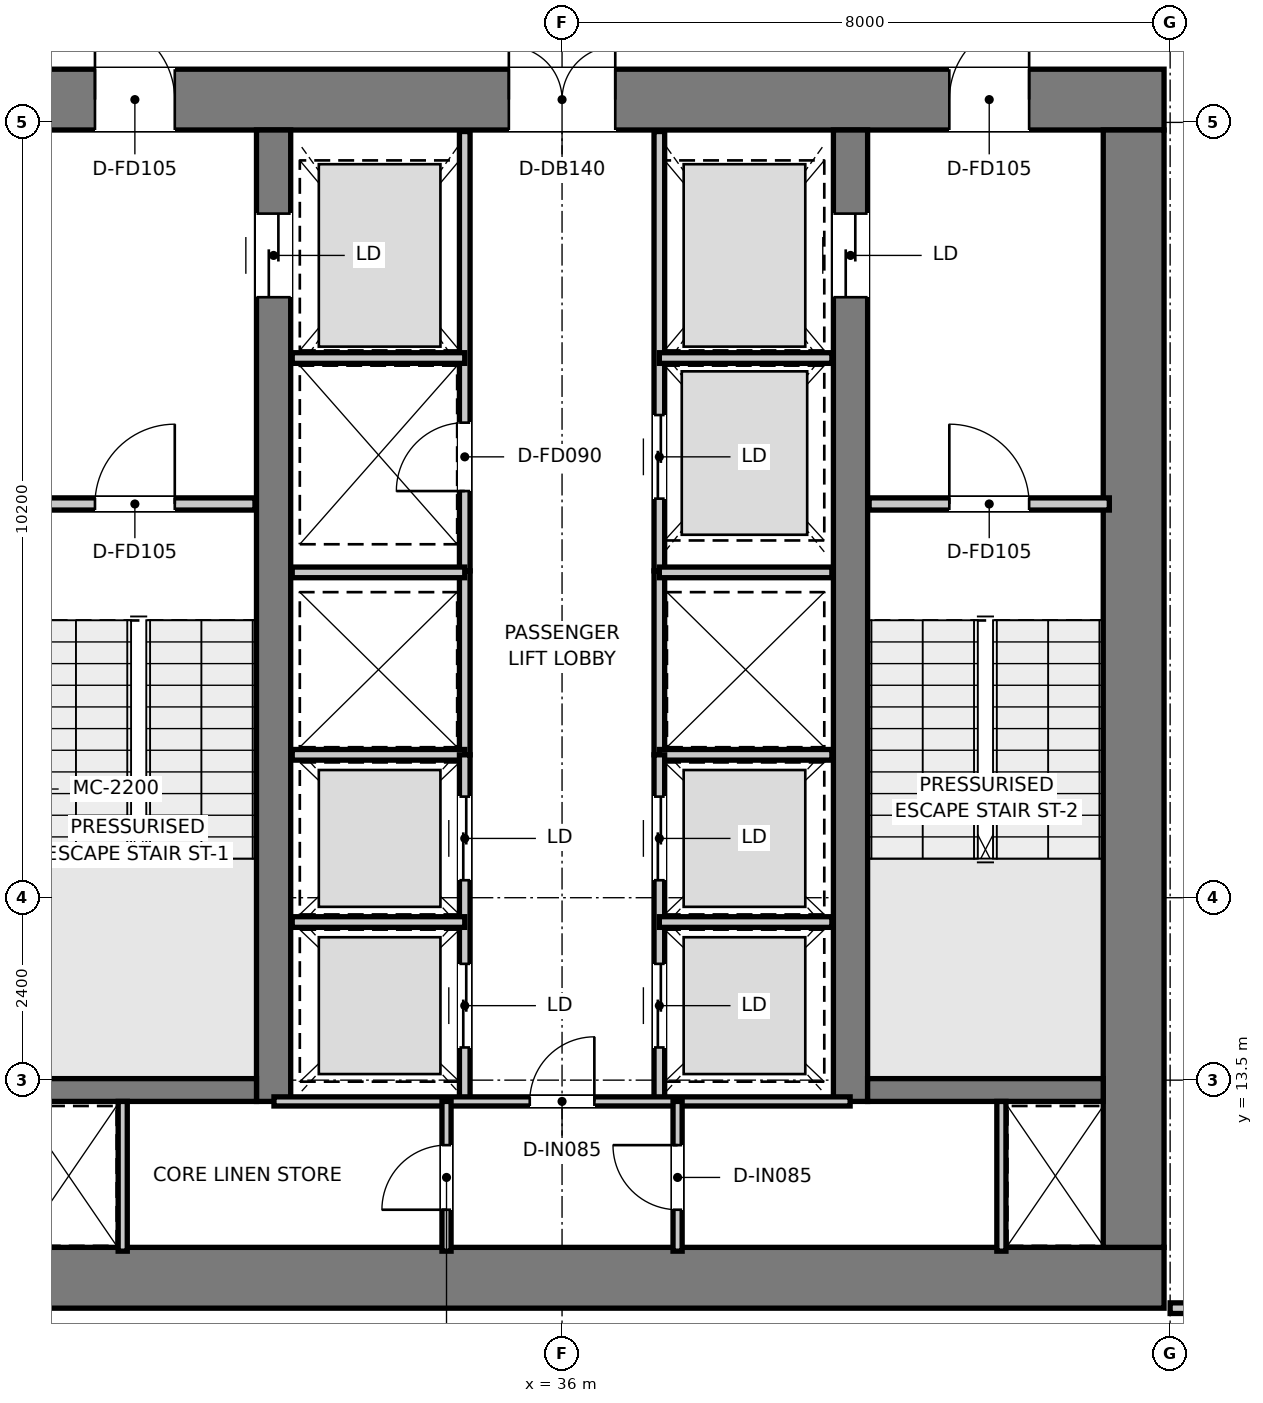
"""IFC4 building model, lengths in metres.
Left out: names, types, materials, properties, quantities, classifications, styles, units other than length and angle.
Written with IfcOpenShell. Run it as: python <this file> out.ifc"""

import sys

from ifc_helpers import new_model, si_unit, direction, frame, frame_2d, origin, place, context, subcontext, project, spatial, rectangle, extrude, element, fill, save


model = new_model("IFC4")
c1 = context("Model", 3, precision=1e-05, world=origin(), true_north=direction((0.0, 1.0)))
c2 = subcontext(c1, "Body", "Model", "MODEL_VIEW")
j1 = project(units=[si_unit("LENGTHUNIT", "METRE"), si_unit("PLANEANGLEUNIT", "RADIAN")], contexts=[c1])
p1 = place(None, origin())
s1 = spatial("IfcSite", under=j1, at=p1, CompositionType="ELEMENT")
p2 = place(p1, origin())
s2 = spatial("IfcBuilding", under=s1, at=p2, CompositionType="ELEMENT")
p3 = place(p2, frame((0.0, 0.0, 40.8)))
s3 = spatial("IfcBuildingStorey", under=s2, at=p3, CompositionType="ELEMENT", Elevation=40.8)
p4 = place(p3, frame((28.08, 10.9, 0.0), z_axis=(0.0, 0.0, 1.0), x_axis=(1.0, 0.0, 0.0)))
e1 = element("IfcWall", 1, at=p4, inside=s3, PredefinedType="SHEAR", context=c2, shape_type="SweptSolid", body=[
    extrude(rectangle(XDim=15.84, YDim=0.8, at=frame_2d((7.92, 0.0))), origin(), (0.0, 0.0, 1.0), 3.95),
])
p5 = place(p3, frame((28.08, 26.4, 0.0), z_axis=(0.0, 0.0, 1.0), x_axis=(1.0, 0.0, 0.0)))
e2 = element("IfcWall", 2, at=p5, inside=s3, PredefinedType="SHEAR", context=c2, shape_type="SweptSolid", body=[
    extrude(rectangle(XDim=15.84, YDim=0.8, at=frame_2d((7.92, 0.0))), origin(), (0.0, 0.0, 1.0), 3.95),
])
p6 = place(p5, frame((7.22, 0.0, 0.0)))
e3 = element("IfcOpeningElement", 3, at=p6, cuts=e2, PredefinedType="OPENING", context=c2, shape_type="SweptSolid", body=[
    extrude(rectangle(XDim=1.4, YDim=2.2, at=frame_2d((0.7, 1.1))), frame((0.0, 0.41, 0.0), z_axis=(0.0, -1.0, 0.0), x_axis=(1.0, 0.0, 0.0)), (0.0, 0.0, 1.0), 0.82),
])
p7 = place(p5, frame((1.775, 0.0, 0.0)))
e4 = element("IfcOpeningElement", 4, at=p7, cuts=e2, PredefinedType="OPENING", context=c2, shape_type="SweptSolid", body=[
    extrude(rectangle(XDim=1.05, YDim=2.1, at=frame_2d((0.525, 1.05))), frame((0.0, 0.41, 0.0), z_axis=(0.0, -1.0, 0.0), x_axis=(1.0, 0.0, 0.0)), (0.0, 0.0, 1.0), 0.82),
])
p8 = place(p5, frame((13.015, 0.0, 0.0)))
e5 = element("IfcOpeningElement", 5, at=p8, cuts=e2, PredefinedType="OPENING", context=c2, shape_type="SweptSolid", body=[
    extrude(rectangle(XDim=1.05, YDim=2.1, at=frame_2d((0.525, 1.05))), frame((0.0, 0.41, 0.0), z_axis=(0.0, -1.0, 0.0), x_axis=(1.0, 0.0, 0.0)), (0.0, 0.0, 1.0), 0.82),
])
p9 = place(p3, frame((43.52, 11.3, 0.0), z_axis=(0.0, 0.0, 1.0), x_axis=(0.0, 1.0, 0.0)))
e6 = element("IfcWall", 6, at=p9, inside=s3, PredefinedType="SHEAR", context=c2, shape_type="SweptSolid", body=[
    extrude(rectangle(XDim=14.7, YDim=0.8, at=frame_2d((7.35, 0.0))), origin(), (0.0, 0.0, 1.0), 3.95),
])
p10 = place(p3, frame((32.205, 13.22, 0.0), z_axis=(0.0, 0.0, 1.0), x_axis=(0.0, 1.0, 0.0)))
e7 = element("IfcWall", 7, at=p10, inside=s3, PredefinedType="SHEAR", context=c2, shape_type="SweptSolid", body=[
    extrude(rectangle(XDim=12.78, YDim=0.45, at=frame_2d((6.39, 0.0))), origin(), (0.0, 0.0, 1.0), 3.95),
])
p11 = place(p10, frame((10.58, 0.0, 0.0)))
e8 = element("IfcOpeningElement", 8, at=p11, cuts=e7, PredefinedType="OPENING", context=c2, shape_type="SweptSolid", body=[
    extrude(rectangle(XDim=1.1, YDim=2.15, at=frame_2d((0.55, 1.075))), frame((0.0, 0.235, 0.0), z_axis=(0.0, -1.0, 0.0), x_axis=(1.0, 0.0, 0.0)), (0.0, 0.0, 1.0), 0.47),
])
p12 = place(p3, frame((39.795, 13.22, 0.0), z_axis=(0.0, 0.0, 1.0), x_axis=(0.0, 1.0, 0.0)))
e9 = element("IfcWall", 9, at=p12, inside=s3, PredefinedType="SHEAR", context=c2, shape_type="SweptSolid", body=[
    extrude(rectangle(XDim=12.78, YDim=0.45, at=frame_2d((6.39, 0.0))), origin(), (0.0, 0.0, 1.0), 3.95),
])
p13 = place(p12, frame((10.58, 0.0, 0.0)))
e10 = element("IfcOpeningElement", 10, at=p13, cuts=e9, PredefinedType="OPENING", context=c2, shape_type="SweptSolid", body=[
    extrude(rectangle(XDim=1.1, YDim=2.15, at=frame_2d((0.55, 1.075))), frame((0.0, 0.235, 0.0), z_axis=(0.0, -1.0, 0.0), x_axis=(1.0, 0.0, 0.0)), (0.0, 0.0, 1.0), 0.47),
])
for number, where, z_axis, x_axis in (
    (11, (28.88, 13.37, 0.0), (0.0, 0.0, 1.0), (1.0, 0.0, 0.0)),
    (12, (40.02, 13.37, 0.0), (0.0, 0.0, 1.0), (1.0, 0.0, 0.0)),
):
    element("IfcWall", number, at=place(p3, frame(where, z_axis=z_axis, x_axis=x_axis)), inside=s3, PredefinedType="SHEAR", context=c2, shape_type="SweptSolid", body=[
        extrude(rectangle(XDim=3.1, YDim=0.3, at=frame_2d((1.55, 0.0))), origin(), (0.0, 0.0, 1.0), 3.95),
    ])
p14 = place(p3, frame((28.8, 21.08, 0.0), z_axis=(0.0, 0.0, 1.0), x_axis=(1.0, 0.0, 0.0)))
e13 = element("IfcWall", 13, at=p14, inside=s3, PredefinedType="PARTITIONING", context=c2, shape_type="SweptSolid", body=[
    extrude(rectangle(XDim=3.16, YDim=0.16, at=frame_2d((1.58, 0.0))), origin(), (0.0, 0.0, 1.0), 3.67),
])
p15 = place(p14, frame((1.055, 0.0, 0.0)))
e14 = element("IfcOpeningElement", 14, at=p15, cuts=e13, PredefinedType="OPENING", context=c2, shape_type="SweptSolid", body=[
    extrude(rectangle(XDim=1.05, YDim=2.1, at=frame_2d((0.525, 1.05))), frame((0.0, 0.09, 0.0), z_axis=(0.0, -1.0, 0.0), x_axis=(1.0, 0.0, 0.0)), (0.0, 0.0, 1.0), 0.18),
])
p16 = place(p3, frame((40.04, 21.08, 0.0), z_axis=(0.0, 0.0, 1.0), x_axis=(1.0, 0.0, 0.0)))
e15 = element("IfcWall", 15, at=p16, inside=s3, PredefinedType="PARTITIONING", context=c2, shape_type="SweptSolid", body=[
    extrude(rectangle(XDim=3.16, YDim=0.16, at=frame_2d((1.58, 0.0))), origin(), (0.0, 0.0, 1.0), 3.67),
])
p17 = place(p16, frame((1.055, 0.0, 0.0)))
e16 = element("IfcOpeningElement", 16, at=p17, cuts=e15, PredefinedType="OPENING", context=c2, shape_type="SweptSolid", body=[
    extrude(rectangle(XDim=1.05, YDim=2.1, at=frame_2d((0.525, 1.05))), frame((0.0, 0.09, 0.0), z_axis=(0.0, -1.0, 0.0), x_axis=(1.0, 0.0, 0.0)), (0.0, 0.0, 1.0), 0.18),
])
p18 = place(p3, frame((34.72, 20.2, 0.0), z_axis=(0.0, 0.0, 1.0), x_axis=(0.0, 1.0, 0.0)))
e17 = element("IfcWall", 17, at=p18, inside=s3, PredefinedType="PARTITIONING", context=c2, shape_type="SweptSolid", body=[
    extrude(rectangle(XDim=5.78, YDim=0.14, at=frame_2d((2.89, 0.0))), origin(), (0.0, 0.0, 1.0), 2.47),
])
p19 = place(p18, frame((1.05, 0.0, 0.0)))
e18 = element("IfcOpeningElement", 18, at=p19, cuts=e17, PredefinedType="OPENING", context=c2, shape_type="SweptSolid", body=[
    extrude(rectangle(XDim=0.9, YDim=2.1, at=frame_2d((0.45, 1.05))), frame((0.0, 0.08, 0.0), z_axis=(0.0, -1.0, 0.0), x_axis=(1.0, 0.0, 0.0)), (0.0, 0.0, 1.0), 0.16),
])
p20 = place(p3, frame((37.28, 20.2, 0.0), z_axis=(0.0, 0.0, 1.0), x_axis=(0.0, 1.0, 0.0)))
e19 = element("IfcWall", 19, at=p20, inside=s3, PredefinedType="PARTITIONING", context=c2, shape_type="SweptSolid", body=[
    extrude(rectangle(XDim=5.78, YDim=0.14, at=frame_2d((2.89, 0.0))), origin(), (0.0, 0.0, 1.0), 2.47),
])
p21 = place(p20, frame((0.95, 0.0, 0.0)))
e20 = element("IfcOpeningElement", 20, at=p21, cuts=e19, PredefinedType="OPENING", context=c2, shape_type="SweptSolid", body=[
    extrude(rectangle(XDim=1.1, YDim=2.15, at=frame_2d((0.55, 1.075))), frame((0.0, 0.08, 0.0), z_axis=(0.0, -1.0, 0.0), x_axis=(1.0, 0.0, 0.0)), (0.0, 0.0, 1.0), 0.16),
])
for number, where, z_axis, x_axis in (
    (21, (32.45, 23.0, 0.0), (0.0, 0.0, 1.0), (1.0, 0.0, 0.0)),
    (22, (37.28, 23.0, 0.0), (0.0, 0.0, 1.0), (1.0, 0.0, 0.0)),
):
    element("IfcWall", number, at=place(p3, frame(where, z_axis=z_axis, x_axis=x_axis)), inside=s3, PredefinedType="PARTITIONING", context=c2, shape_type="SweptSolid", body=[
        extrude(rectangle(XDim=2.27, YDim=0.14, at=frame_2d((1.135, 0.0))), origin(), (0.0, 0.0, 1.0), 2.47),
    ])
for number, where, z_axis, x_axis in (
    (23, (34.72, 17.78, 0.0), (0.0, 0.0, 1.0), (0.0, 1.0, 0.0)),
    (24, (37.28, 17.78, 0.0), (0.0, 0.0, 1.0), (0.0, 1.0, 0.0)),
):
    element("IfcWall", number, at=place(p3, frame(where, z_axis=z_axis, x_axis=x_axis)), inside=s3, PredefinedType="PARTITIONING", context=c2, shape_type="SweptSolid", body=[
        extrude(rectangle(XDim=2.42, YDim=0.14, at=frame_2d((1.21, 0.0))), origin(), (0.0, 0.0, 1.0), 3.67),
    ])
for number, where, z_axis, x_axis in (
    (25, (32.45, 17.78, 0.0), (0.0, 0.0, 1.0), (1.0, 0.0, 0.0)),
    (26, (32.45, 20.18, 0.0), (0.0, 0.0, 1.0), (1.0, 0.0, 0.0)),
    (27, (37.28, 17.78, 0.0), (0.0, 0.0, 1.0), (1.0, 0.0, 0.0)),
    (28, (37.28, 20.18, 0.0), (0.0, 0.0, 1.0), (1.0, 0.0, 0.0)),
):
    element("IfcWall", number, at=place(p3, frame(where, z_axis=z_axis, x_axis=x_axis)), inside=s3, PredefinedType="PARTITIONING", context=c2, shape_type="SweptSolid", body=[
        extrude(rectangle(XDim=2.27, YDim=0.14, at=frame_2d((1.135, 0.0))), origin(), (0.0, 0.0, 1.0), 3.67),
    ])
p22 = place(p3, frame((34.72, 13.22, 0.0), z_axis=(0.0, 0.0, 1.0), x_axis=(0.0, 1.0, 0.0)))
e29 = element("IfcWall", 29, at=p22, inside=s3, PredefinedType="PARTITIONING", context=c2, shape_type="SweptSolid", body=[
    extrude(rectangle(XDim=4.56, YDim=0.14, at=frame_2d((2.28, 0.0))), origin(), (0.0, 0.0, 1.0), 3.67),
])
p23 = place(p22, frame((0.71, 0.0, 0.0)))
e30 = element("IfcOpeningElement", 30, at=p23, cuts=e29, PredefinedType="OPENING", context=c2, shape_type="SweptSolid", body=[
    extrude(rectangle(XDim=1.1, YDim=2.15, at=frame_2d((0.55, 1.075))), frame((0.0, 0.08, 0.0), z_axis=(0.0, -1.0, 0.0), x_axis=(1.0, 0.0, 0.0)), (0.0, 0.0, 1.0), 0.16),
])
p24 = place(p22, frame((2.91, 0.0, 0.0)))
e31 = element("IfcOpeningElement", 31, at=p24, cuts=e29, PredefinedType="OPENING", context=c2, shape_type="SweptSolid", body=[
    extrude(rectangle(XDim=1.1, YDim=2.15, at=frame_2d((0.55, 1.075))), frame((0.0, 0.08, 0.0), z_axis=(0.0, -1.0, 0.0), x_axis=(1.0, 0.0, 0.0)), (0.0, 0.0, 1.0), 0.16),
])
p25 = place(p3, frame((32.45, 15.58, 0.0), z_axis=(0.0, 0.0, 1.0), x_axis=(1.0, 0.0, 0.0)))
e32 = element("IfcWall", 32, at=p25, inside=s3, PredefinedType="PARTITIONING", context=c2, shape_type="SweptSolid", body=[
    extrude(rectangle(XDim=2.27, YDim=0.14, at=frame_2d((1.135, 0.0))), origin(), (0.0, 0.0, 1.0), 3.67),
])
p26 = place(p3, frame((37.28, 13.22, 0.0), z_axis=(0.0, 0.0, 1.0), x_axis=(0.0, 1.0, 0.0)))
e33 = element("IfcWall", 33, at=p26, inside=s3, PredefinedType="PARTITIONING", context=c2, shape_type="SweptSolid", body=[
    extrude(rectangle(XDim=4.56, YDim=0.14, at=frame_2d((2.28, 0.0))), origin(), (0.0, 0.0, 1.0), 3.67),
])
p27 = place(p26, frame((0.71, 0.0, 0.0)))
e34 = element("IfcOpeningElement", 34, at=p27, cuts=e33, PredefinedType="OPENING", context=c2, shape_type="SweptSolid", body=[
    extrude(rectangle(XDim=1.1, YDim=2.15, at=frame_2d((0.55, 1.075))), frame((0.0, 0.08, 0.0), z_axis=(0.0, -1.0, 0.0), x_axis=(1.0, 0.0, 0.0)), (0.0, 0.0, 1.0), 0.16),
])
p28 = place(p26, frame((2.91, 0.0, 0.0)))
e35 = element("IfcOpeningElement", 35, at=p28, cuts=e33, PredefinedType="OPENING", context=c2, shape_type="SweptSolid", body=[
    extrude(rectangle(XDim=1.1, YDim=2.15, at=frame_2d((0.55, 1.075))), frame((0.0, 0.08, 0.0), z_axis=(0.0, -1.0, 0.0), x_axis=(1.0, 0.0, 0.0)), (0.0, 0.0, 1.0), 0.16),
])
p29 = place(p3, frame((37.28, 15.58, 0.0), z_axis=(0.0, 0.0, 1.0), x_axis=(1.0, 0.0, 0.0)))
e36 = element("IfcWall", 36, at=p29, inside=s3, PredefinedType="PARTITIONING", context=c2, shape_type="SweptSolid", body=[
    extrude(rectangle(XDim=2.27, YDim=0.14, at=frame_2d((1.135, 0.0))), origin(), (0.0, 0.0, 1.0), 3.67),
])
for number, where, z_axis, x_axis in (
    (37, (30.22, 11.25, 0.0), (0.0, 0.0, 1.0), (0.0, 1.0, 0.0)),
    (38, (41.78, 11.25, 0.0), (0.0, 0.0, 1.0), (0.0, 1.0, 0.0)),
):
    element("IfcWall", number, at=place(p3, frame(where, z_axis=z_axis, x_axis=x_axis)), inside=s3, PredefinedType="PARTITIONING", context=c2, shape_type="SweptSolid", body=[
        extrude(rectangle(XDim=1.97, YDim=0.12, at=frame_2d((0.985, 0.0))), origin(), (0.0, 0.0, 1.0), 3.67),
    ])
p30 = place(p3, frame((32.21, 13.22, 0.0), z_axis=(0.0, 0.0, 1.0), x_axis=(1.0, 0.0, 0.0)))
e39 = element("IfcWall", 39, at=p30, inside=s3, PredefinedType="PARTITIONING", context=c2, shape_type="SweptSolid", body=[
    extrude(rectangle(XDim=7.58, YDim=0.12, at=frame_2d((3.79, 0.0))), origin(), (0.0, 0.0, 1.0), 3.67),
])
p31 = place(p30, frame((3.365, 0.0, 0.0)))
e40 = element("IfcOpeningElement", 40, at=p31, cuts=e39, PredefinedType="OPENING", context=c2, shape_type="SweptSolid", body=[
    extrude(rectangle(XDim=0.85, YDim=2.1, at=frame_2d((0.425, 1.05))), frame((0.0, 0.07, 0.0), z_axis=(0.0, -1.0, 0.0), x_axis=(1.0, 0.0, 0.0)), (0.0, 0.0, 1.0), 0.14),
])
p32 = place(p3, frame((34.48, 11.25, 0.0), z_axis=(0.0, 0.0, 1.0), x_axis=(0.0, 1.0, 0.0)))
e41 = element("IfcWall", 41, at=p32, inside=s3, PredefinedType="PARTITIONING", context=c2, shape_type="SweptSolid", body=[
    extrude(rectangle(XDim=1.97, YDim=0.12, at=frame_2d((0.985, 0.0))), origin(), (0.0, 0.0, 1.0), 3.67),
])
p33 = place(p32, frame((0.545, 0.0, 0.0)))
e42 = element("IfcOpeningElement", 42, at=p33, cuts=e41, PredefinedType="OPENING", context=c2, shape_type="SweptSolid", body=[
    extrude(rectangle(XDim=0.85, YDim=2.1, at=frame_2d((0.425, 1.05))), frame((0.0, 0.07, 0.0), z_axis=(0.0, -1.0, 0.0), x_axis=(1.0, 0.0, 0.0)), (0.0, 0.0, 1.0), 0.14),
])
p34 = place(p3, frame((37.52, 11.25, 0.0), z_axis=(0.0, 0.0, 1.0), x_axis=(0.0, 1.0, 0.0)))
e43 = element("IfcWall", 43, at=p34, inside=s3, PredefinedType="PARTITIONING", context=c2, shape_type="SweptSolid", body=[
    extrude(rectangle(XDim=1.97, YDim=0.12, at=frame_2d((0.985, 0.0))), origin(), (0.0, 0.0, 1.0), 3.67),
])
p35 = place(p34, frame((0.545, 0.0, 0.0)))
e44 = element("IfcOpeningElement", 44, at=p35, cuts=e43, PredefinedType="OPENING", context=c2, shape_type="SweptSolid", body=[
    extrude(rectangle(XDim=0.85, YDim=2.1, at=frame_2d((0.425, 1.05))), frame((0.0, 0.07, 0.0), z_axis=(0.0, -1.0, 0.0), x_axis=(1.0, 0.0, 0.0)), (0.0, 0.0, 1.0), 0.14),
])
p36 = place(p3, frame((44.0, 10.5, 0.0), z_axis=(0.0, 0.0, 1.0), x_axis=(1.0, 0.0, 0.0)))
e45 = element("IfcWall", 45, at=p36, inside=s3, PredefinedType="PARTITIONING", context=c2, shape_type="SweptSolid", body=[
    extrude(rectangle(XDim=1.68, YDim=0.14, at=frame_2d((0.84, 0.0))), origin(), (0.0, 0.0, 1.0), 3.67),
])
p37 = place(p15, origin())
e46 = element("IfcDoor", 46, at=p37, inside=s3, OperationType="SINGLE_SWING_RIGHT", PredefinedType="DOOR", context=c2, shape_type="SweptSolid", body=[
    extrude(rectangle(XDim=1.05, YDim=2.1, at=frame_2d((0.525, 1.05))), frame((0.0, 0.025, 0.0), z_axis=(0.0, -1.0, 0.0), x_axis=(1.0, 0.0, 0.0)), (0.0, 0.0, 1.0), 0.05),
])
fill(e14, e46)
p38 = place(p17, origin())
e47 = element("IfcDoor", 47, at=p38, inside=s3, OperationType="SINGLE_SWING_LEFT", PredefinedType="DOOR", context=c2, shape_type="SweptSolid", body=[
    extrude(rectangle(XDim=1.05, YDim=2.1, at=frame_2d((0.525, 1.05))), frame((0.0, 0.025, 0.0), z_axis=(0.0, -1.0, 0.0), x_axis=(1.0, 0.0, 0.0)), (0.0, 0.0, 1.0), 0.05),
])
fill(e16, e47)
p39 = place(p6, origin())
e48 = element("IfcDoor", 48, at=p39, inside=s3, OperationType="DOUBLE_DOOR_SINGLE_SWING", PredefinedType="DOOR", context=c2, shape_type="SweptSolid", body=[
    extrude(rectangle(XDim=1.4, YDim=2.2, at=frame_2d((0.7, 1.1))), frame((0.0, 0.025, 0.0), z_axis=(0.0, -1.0, 0.0), x_axis=(1.0, 0.0, 0.0)), (0.0, 0.0, 1.0), 0.05),
])
fill(e3, e48)
p40 = place(p7, origin())
e49 = element("IfcDoor", 49, at=p40, inside=s3, OperationType="SINGLE_SWING_LEFT", PredefinedType="DOOR", context=c2, shape_type="SweptSolid", body=[
    extrude(rectangle(XDim=1.05, YDim=2.1, at=frame_2d((0.525, 1.05))), frame((0.0, 0.025, 0.0), z_axis=(0.0, -1.0, 0.0), x_axis=(1.0, 0.0, 0.0)), (0.0, 0.0, 1.0), 0.05),
])
fill(e4, e49)
p41 = place(p8, origin())
e50 = element("IfcDoor", 50, at=p41, inside=s3, OperationType="SINGLE_SWING_RIGHT", PredefinedType="DOOR", context=c2, shape_type="SweptSolid", body=[
    extrude(rectangle(XDim=1.05, YDim=2.1, at=frame_2d((0.525, 1.05))), frame((0.0, 0.025, 0.0), z_axis=(0.0, -1.0, 0.0), x_axis=(1.0, 0.0, 0.0)), (0.0, 0.0, 1.0), 0.05),
])
fill(e5, e50)
p42 = place(p11, origin())
e51 = element("IfcDoor", 51, at=p42, inside=s3, OperationType="DOUBLE_DOOR_SLIDING", PredefinedType="DOOR", context=c2, shape_type="SweptSolid", body=[
    extrude(rectangle(XDim=1.1, YDim=2.15, at=frame_2d((0.55, 1.075))), frame((0.0, 0.025, 0.0), z_axis=(0.0, -1.0, 0.0), x_axis=(1.0, 0.0, 0.0)), (0.0, 0.0, 1.0), 0.05),
])
fill(e8, e51)
p43 = place(p13, origin())
e52 = element("IfcDoor", 52, at=p43, inside=s3, OperationType="DOUBLE_DOOR_SLIDING", PredefinedType="DOOR", context=c2, shape_type="SweptSolid", body=[
    extrude(rectangle(XDim=1.1, YDim=2.15, at=frame_2d((0.55, 1.075))), frame((0.0, 0.025, 0.0), z_axis=(0.0, -1.0, 0.0), x_axis=(1.0, 0.0, 0.0)), (0.0, 0.0, 1.0), 0.05),
])
fill(e10, e52)
p44 = place(p19, origin())
e53 = element("IfcDoor", 53, at=p44, inside=s3, OperationType="SINGLE_SWING_LEFT", PredefinedType="DOOR", context=c2, shape_type="SweptSolid", body=[
    extrude(rectangle(XDim=0.9, YDim=2.1, at=frame_2d((0.45, 1.05))), frame((0.0, 0.025, 0.0), z_axis=(0.0, -1.0, 0.0), x_axis=(1.0, 0.0, 0.0)), (0.0, 0.0, 1.0), 0.05),
])
fill(e18, e53)
p45 = place(p21, origin())
e54 = element("IfcDoor", 54, at=p45, inside=s3, OperationType="DOUBLE_DOOR_SLIDING", PredefinedType="DOOR", context=c2, shape_type="SweptSolid", body=[
    extrude(rectangle(XDim=1.1, YDim=2.15, at=frame_2d((0.55, 1.075))), frame((0.0, 0.025, 0.0), z_axis=(0.0, -1.0, 0.0), x_axis=(1.0, 0.0, 0.0)), (0.0, 0.0, 1.0), 0.05),
])
fill(e20, e54)
p46 = place(p23, origin())
e55 = element("IfcDoor", 55, at=p46, inside=s3, OperationType="DOUBLE_DOOR_SLIDING", PredefinedType="DOOR", context=c2, shape_type="SweptSolid", body=[
    extrude(rectangle(XDim=1.1, YDim=2.15, at=frame_2d((0.55, 1.075))), frame((0.0, 0.025, 0.0), z_axis=(0.0, -1.0, 0.0), x_axis=(1.0, 0.0, 0.0)), (0.0, 0.0, 1.0), 0.05),
])
fill(e30, e55)
p47 = place(p24, origin())
e56 = element("IfcDoor", 56, at=p47, inside=s3, OperationType="DOUBLE_DOOR_SLIDING", PredefinedType="DOOR", context=c2, shape_type="SweptSolid", body=[
    extrude(rectangle(XDim=1.1, YDim=2.15, at=frame_2d((0.55, 1.075))), frame((0.0, 0.025, 0.0), z_axis=(0.0, -1.0, 0.0), x_axis=(1.0, 0.0, 0.0)), (0.0, 0.0, 1.0), 0.05),
])
fill(e31, e56)
p48 = place(p27, origin())
e57 = element("IfcDoor", 57, at=p48, inside=s3, OperationType="DOUBLE_DOOR_SLIDING", PredefinedType="DOOR", context=c2, shape_type="SweptSolid", body=[
    extrude(rectangle(XDim=1.1, YDim=2.15, at=frame_2d((0.55, 1.075))), frame((0.0, 0.025, 0.0), z_axis=(0.0, -1.0, 0.0), x_axis=(1.0, 0.0, 0.0)), (0.0, 0.0, 1.0), 0.05),
])
fill(e34, e57)
p49 = place(p28, origin())
e58 = element("IfcDoor", 58, at=p49, inside=s3, OperationType="DOUBLE_DOOR_SLIDING", PredefinedType="DOOR", context=c2, shape_type="SweptSolid", body=[
    extrude(rectangle(XDim=1.1, YDim=2.15, at=frame_2d((0.55, 1.075))), frame((0.0, 0.025, 0.0), z_axis=(0.0, -1.0, 0.0), x_axis=(1.0, 0.0, 0.0)), (0.0, 0.0, 1.0), 0.05),
])
fill(e35, e58)
p50 = place(p31, origin())
e59 = element("IfcDoor", 59, at=p50, inside=s3, OperationType="SINGLE_SWING_RIGHT", PredefinedType="DOOR", context=c2, shape_type="SweptSolid", body=[
    extrude(rectangle(XDim=0.85, YDim=2.1, at=frame_2d((0.425, 1.05))), frame((0.0, 0.025, 0.0), z_axis=(0.0, -1.0, 0.0), x_axis=(1.0, 0.0, 0.0)), (0.0, 0.0, 1.0), 0.05),
])
fill(e40, e59)
p51 = place(p33, origin())
e60 = element("IfcDoor", 60, at=p51, inside=s3, OperationType="SINGLE_SWING_LEFT", PredefinedType="DOOR", context=c2, shape_type="SweptSolid", body=[
    extrude(rectangle(XDim=0.85, YDim=2.1, at=frame_2d((0.425, 1.05))), frame((0.0, 0.025, 0.0), z_axis=(0.0, -1.0, 0.0), x_axis=(1.0, 0.0, 0.0)), (0.0, 0.0, 1.0), 0.05),
])
fill(e42, e60)
p52 = place(p35, origin())
e61 = element("IfcDoor", 61, at=p52, inside=s3, OperationType="SINGLE_SWING_RIGHT", PredefinedType="DOOR", context=c2, shape_type="SweptSolid", body=[
    extrude(rectangle(XDim=0.85, YDim=2.1, at=frame_2d((0.425, 1.05))), frame((0.0, 0.025, 0.0), z_axis=(0.0, -1.0, 0.0), x_axis=(1.0, 0.0, 0.0)), (0.0, 0.0, 1.0), 0.05),
])
fill(e44, e61)
save(model, sys.argv[1])
